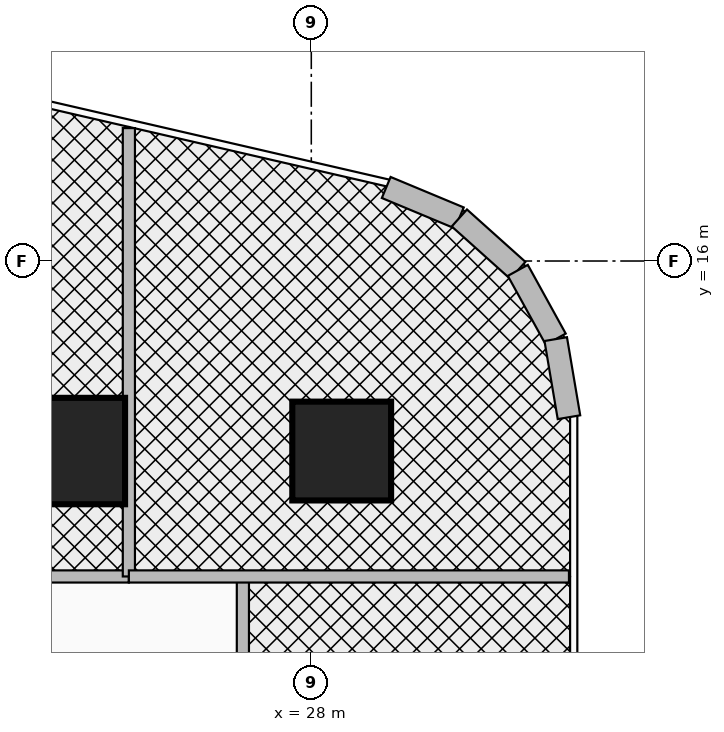
"""IFC4 building model, lengths in metres.
Left out: names, types, materials, properties, quantities, classifications, styles, units other than length and angle.
Written with IfcOpenShell. Run it as: python <this file> out.ifc"""

import sys

from ifc_helpers import new_model, si_unit, direction, frame, frame_2d, origin, origin_2d, place, context, subcontext, project, spatial, rectangle, circle, extrude, source, transform, mapped, element, fill, save


model = new_model("IFC4")
c1 = context("Model", 3, precision=1e-05, world=origin(), true_north=direction((0.0, 1.0)))
c2 = subcontext(c1, "Body", "Model", "MODEL_VIEW")
j1 = project(units=[si_unit("LENGTHUNIT", "METRE"), si_unit("PLANEANGLEUNIT", "RADIAN")], contexts=[c1])
p1 = place(None, origin())
s1 = spatial("IfcSite", under=j1, at=p1, CompositionType="ELEMENT")
p2 = place(p1, origin())
s2 = spatial("IfcBuilding", under=s1, at=p2, CompositionType="ELEMENT")
p3 = place(p2, frame((0.0, 0.0, 70.4)))
s3 = spatial("IfcBuildingStorey", under=s2, at=p3, CompositionType="ELEMENT", Elevation=70.4)
m1 = source(origin(), c2, "Body", "SweptSolid", [
    extrude(rectangle(XDim=1.4, YDim=1.4, at=origin_2d()), origin(), (0.0, 0.0, 1.0), 3.7),
])
p4 = place(p3, frame((24.85, 13.5, 0.0), z_axis=(0.0, 0.0, 1.0), x_axis=(1.0, 0.0, 0.0)))
e1 = element("IfcColumn", 1, at=p4, inside=s3, PredefinedType="COLUMN", context=c2, shape_type="MappedRepresentation", body=[
    mapped(m1, transform((0.0, 0.0, 0.0), x_axis=(1.0, 0.0, 0.0), y_axis=(0.0, 1.0, 0.0), z_axis=(0.0, 0.0, 1.0), scale=1.0)),
])
m2 = source(origin(), c2, "Body", "SweptSolid", [
    extrude(circle(Radius=0.65, at=origin_2d()), origin(), (0.0, 0.0, 1.0), 3.7),
])
p5 = place(p3, frame((28.4, 13.5, 0.0), z_axis=(0.0, 0.0, 1.0), x_axis=(1.0, 0.0, 0.0)))
e2 = element("IfcColumn", 2, at=p5, inside=s3, PredefinedType="COLUMN", context=c2, shape_type="MappedRepresentation", body=[
    mapped(m2, transform((0.0, 0.0, 0.0), x_axis=(1.0, 0.0, 0.0), y_axis=(0.0, 1.0, 0.0), z_axis=(0.0, 0.0, 1.0), scale=1.0)),
])
p6 = place(p3, frame((28.986, 16.967, 0.0), z_axis=(0.0, 0.0, 1.0), x_axis=(0.923083852684, -0.384598753136, 0.0)))
e3 = element("IfcWall", 3, at=p6, inside=s3, PredefinedType="SOLIDWALL", context=c2, shape_type="SweptSolid", body=[
    extrude(rectangle(XDim=1.042, YDim=0.3, at=frame_2d((0.521, 0.0))), origin(), (0.0, 0.0, 1.0), 3.46),
])
p7 = place(p3, frame((29.948, 16.566, 0.0), z_axis=(0.0, 0.0, 1.0), x_axis=(0.744585645533, -0.66752694063, 0.0)))
e4 = element("IfcWall", 4, at=p7, inside=s3, PredefinedType="SOLIDWALL", context=c2, shape_type="SweptSolid", body=[
    extrude(rectangle(XDim=1.033, YDim=0.3, at=frame_2d((0.517, 0.0))), origin(), (0.0, 0.0, 1.0), 3.46),
])
p8 = place(p3, frame((30.717, 15.877, 0.0), z_axis=(0.0, 0.0, 1.0), x_axis=(0.482971098131, -0.875636293429, 0.0)))
e5 = element("IfcWall", 5, at=p8, inside=s3, PredefinedType="SOLIDWALL", context=c2, shape_type="SweptSolid", body=[
    extrude(rectangle(XDim=1.033, YDim=0.3, at=frame_2d((0.516, 0.0))), origin(), (0.0, 0.0, 1.0), 3.46),
])
p9 = place(p3, frame((31.216, 14.973, 0.0), z_axis=(0.0, 0.0, 1.0), x_axis=(0.167019462117, -0.985953598946, 0.0)))
e6 = element("IfcWall", 6, at=p9, inside=s3, PredefinedType="SOLIDWALL", context=c2, shape_type="SweptSolid", body=[
    extrude(rectangle(XDim=1.042, YDim=0.3, at=frame_2d((0.521, 0.0))), origin(), (0.0, 0.0, 1.0), 3.46),
])
p10 = place(p3, frame((15.4, 11.85, 0.0), z_axis=(0.0, 0.0, 1.0), x_axis=(1.0, 0.0, 0.0)))
e7 = element("IfcWall", 7, at=p10, inside=s3, PredefinedType="PARTITIONING", context=c2, shape_type="SweptSolid", body=[
    extrude(rectangle(XDim=10.2, YDim=0.16, at=frame_2d((5.1, 0.0))), origin(), (0.0, 0.0, 1.0), 2.834),
])
p11 = place(p10, frame((4.65, 0.0, 0.0)))
e8 = element("IfcOpeningElement", 8, at=p11, cuts=e7, PredefinedType="OPENING", context=c2, shape_type="SweptSolid", body=[
    extrude(rectangle(XDim=0.9, YDim=2.1, at=frame_2d((0.45, 1.05))), frame((0.0, 0.095, 0.0), z_axis=(0.0, -1.0, 0.0), x_axis=(1.0, 0.0, 0.0)), (0.0, 0.0, 1.0), 0.19),
])
p12 = place(p3, frame((25.6, 11.85, 0.0), z_axis=(0.0, 0.0, 1.0), x_axis=(0.0, 1.0, 0.0)))
e9 = element("IfcWall", 9, at=p12, inside=s3, PredefinedType="PARTITIONING", context=c2, shape_type="SweptSolid", body=[
    extrude(rectangle(XDim=5.898, YDim=0.16, at=frame_2d((2.949, 0.0))), origin(), (0.0, 0.0, 1.0), 2.583),
])
p13 = place(p3, frame((27.1, -13.89, 0.0), z_axis=(0.0, 0.0, 1.0), x_axis=(0.0, 1.0, 0.0)))
e10 = element("IfcWall", 10, at=p13, inside=s3, PredefinedType="PARTITIONING", context=c2, shape_type="SweptSolid", body=[
    extrude(rectangle(XDim=25.74, YDim=0.16, at=frame_2d((12.87, 0.0))), origin(), (0.0, 0.0, 1.0), 2.583),
])
p14 = place(p13, frame((2.62, 0.0, 0.0)))
e11 = element("IfcOpeningElement", 11, at=p14, cuts=e10, PredefinedType="OPENING", context=c2, shape_type="SweptSolid", body=[
    extrude(rectangle(XDim=0.95, YDim=2.15, at=frame_2d((0.475, 1.075))), frame((0.0, 0.095, 0.0), z_axis=(0.0, -1.0, 0.0), x_axis=(1.0, 0.0, 0.0)), (0.0, 0.0, 1.0), 0.19),
])
p15 = place(p13, frame((8.484, 0.0, 0.0)))
e12 = element("IfcOpeningElement", 12, at=p15, cuts=e10, PredefinedType="OPENING", context=c2, shape_type="SweptSolid", body=[
    extrude(rectangle(XDim=0.95, YDim=2.15, at=frame_2d((0.475, 1.075))), frame((0.0, 0.095, 0.0), z_axis=(0.0, -1.0, 0.0), x_axis=(1.0, 0.0, 0.0)), (0.0, 0.0, 1.0), 0.19),
])
p16 = place(p13, frame((14.197, 0.0, 0.0)))
e13 = element("IfcOpeningElement", 13, at=p16, cuts=e10, PredefinedType="OPENING", context=c2, shape_type="SweptSolid", body=[
    extrude(rectangle(XDim=0.95, YDim=2.15, at=frame_2d((0.475, 1.075))), frame((0.0, 0.095, 0.0), z_axis=(0.0, -1.0, 0.0), x_axis=(1.0, 0.0, 0.0)), (0.0, 0.0, 1.0), 0.19),
])
p17 = place(p13, frame((21.648, 0.0, 0.0)))
e14 = element("IfcOpeningElement", 14, at=p17, cuts=e10, PredefinedType="OPENING", context=c2, shape_type="SweptSolid", body=[
    extrude(rectangle(XDim=0.95, YDim=2.15, at=frame_2d((0.475, 1.075))), frame((0.0, 0.095, 0.0), z_axis=(0.0, -1.0, 0.0), x_axis=(1.0, 0.0, 0.0)), (0.0, 0.0, 1.0), 0.19),
])
p18 = place(p3, frame((25.6, 11.85, 0.0), z_axis=(0.0, 0.0, 1.0), x_axis=(1.0, 0.0, 0.0)))
e15 = element("IfcWall", 15, at=p18, inside=s3, PredefinedType="PARTITIONING", context=c2, shape_type="SweptSolid", body=[
    extrude(rectangle(XDim=5.79, YDim=0.16, at=frame_2d((2.895, 0.0))), origin(), (0.0, 0.0, 1.0), 2.896),
])
p19 = place(p18, frame((0.3, 0.0, 0.0)))
e16 = element("IfcOpeningElement", 16, at=p19, cuts=e15, PredefinedType="OPENING", context=c2, shape_type="SweptSolid", body=[
    extrude(rectangle(XDim=0.9, YDim=2.1, at=frame_2d((0.45, 1.05))), frame((0.0, 0.095, 0.0), z_axis=(0.0, -1.0, 0.0), x_axis=(1.0, 0.0, 0.0)), (0.0, 0.0, 1.0), 0.19),
])
p20 = place(p19, origin())
e17 = element("IfcDoor", 17, at=p20, inside=s3, OperationType="SINGLE_SWING_LEFT", PredefinedType="DOOR", context=c2, shape_type="SweptSolid", body=[
    extrude(rectangle(XDim=0.9, YDim=2.1, at=frame_2d((0.45, 1.05))), frame((0.0, 0.025, 0.0), z_axis=(0.0, -1.0, 0.0), x_axis=(1.0, 0.0, 0.0)), (0.0, 0.0, 1.0), 0.05),
])
fill(e16, e17)
save(model, sys.argv[1])
